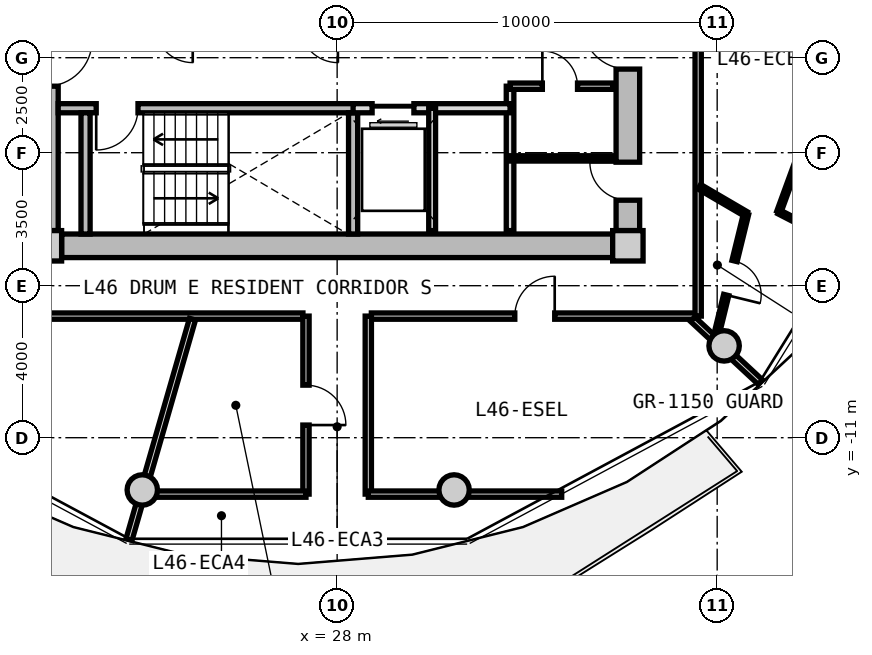
"""IFC4 building model, lengths in metres.
Left out: names, types, materials, properties, quantities, classifications, styles, units other than length and angle.
Written with IfcOpenShell. Run it as: python <this file> out.ifc"""

import sys

from ifc_helpers import new_model, si_unit, direction, frame, frame_2d, origin, origin_2d, place, context, subcontext, project, spatial, rectangle, circle, extrude, source, transform, mapped, element, fill, save


model = new_model("IFC4")
c1 = context("Model", 3, precision=1e-05, world=origin(), true_north=direction((0.0, 1.0)))
c2 = subcontext(c1, "Body", "Model", "MODEL_VIEW")
j1 = project(units=[si_unit("LENGTHUNIT", "METRE"), si_unit("PLANEANGLEUNIT", "RADIAN")], contexts=[c1])
p1 = place(None, origin())
s1 = spatial("IfcSite", under=j1, at=p1, CompositionType="ELEMENT")
p2 = place(p1, origin())
s2 = spatial("IfcBuilding", under=s1, at=p2, CompositionType="ELEMENT")
p3 = place(p2, frame((0.0, 0.0, 149.55)))
s3 = spatial("IfcBuildingStorey", under=s2, at=p3, CompositionType="ELEMENT", Elevation=149.55)
m1 = source(origin(), c2, "Body", "SweptSolid", [
    extrude(rectangle(XDim=0.8, YDim=0.8, at=origin_2d()), origin(), (0.0, 0.0, 1.0), 3.05),
])
for number, where, z_axis, x_axis in (
    (1, (20.35, -5.95, 0.0), (0.0, 0.0, 1.0), (1.0, 0.0, 0.0)),
    (2, (35.65, -5.95, 0.0), (0.0, 0.0, 1.0), (1.0, 0.0, 0.0)),
):
    element("IfcColumn", number, at=place(p3, frame(where, z_axis=z_axis, x_axis=x_axis)), inside=s3, PredefinedType="COLUMN", context=c2, shape_type="MappedRepresentation", body=[
        mapped(m1, transform((0.0, 0.0, 0.0), x_axis=(1.0, 0.0, 0.0), y_axis=(0.0, 1.0, 0.0), z_axis=(0.0, 0.0, 1.0), scale=1.0)),
    ])
m2 = source(origin(), c2, "Body", "SweptSolid", [
    extrude(rectangle(XDim=14.5, YDim=0.62, at=frame_2d((7.25, 0.0))), origin(), (0.0, 0.0, 1.0), 2.81),
])
p4 = place(p3, frame((35.25, -5.95, 0.0), z_axis=(0.0, 0.0, 1.0), x_axis=(-1.0, 0.0, 0.0)))
e3 = element("IfcWall", 3, at=p4, inside=s3, PredefinedType="SHEAR", context=c2, shape_type="MappedRepresentation", body=[
    mapped(m2, transform((0.0, 0.0, 0.0), x_axis=(1.0, 0.0, 0.0), y_axis=(0.0, 1.0, 0.0), z_axis=(0.0, 0.0, 1.0), scale=1.0)),
])
m3 = source(origin(), c2, "Body", "SweptSolid", [
    extrude(rectangle(XDim=11.1, YDim=0.62, at=frame_2d((5.55, 0.0))), origin(), (0.0, 0.0, 1.0), 2.81),
])
p5 = place(p3, frame((20.35, -5.55, 0.0), z_axis=(0.0, 0.0, 1.0), x_axis=(0.0, 1.0, 0.0)))
e4 = element("IfcWall", 4, at=p5, inside=s3, PredefinedType="SHEAR", context=c2, shape_type="MappedRepresentation", body=[
    mapped(m3, transform((0.0, 0.0, 0.0), x_axis=(1.0, 0.0, 0.0), y_axis=(0.0, 1.0, 0.0), z_axis=(0.0, 0.0, 1.0), scale=1.0)),
])
p6 = place(p5, frame((3.8, 0.0, 0.0)))
e5 = element("IfcOpeningElement", 5, at=p6, cuts=e4, PredefinedType="OPENING", context=c2, shape_type="SweptSolid", body=[
    extrude(rectangle(XDim=1.2, YDim=2.15, at=frame_2d((0.6, 1.075))), frame((0.0, 0.32, 0.0), z_axis=(0.0, -1.0, 0.0), x_axis=(1.0, 0.0, 0.0)), (0.0, 0.0, 1.0), 0.64),
])
p7 = place(p3, frame((35.65, 5.55, 0.0), z_axis=(0.0, 0.0, 1.0), x_axis=(0.0, -1.0, 0.0)))
e6 = element("IfcWall", 6, at=p7, inside=s3, PredefinedType="SHEAR", context=c2, shape_type="MappedRepresentation", body=[
    mapped(m3, transform((0.0, 0.0, 0.0), x_axis=(1.0, 0.0, 0.0), y_axis=(0.0, 1.0, 0.0), z_axis=(0.0, 0.0, 1.0), scale=1.0)),
])
p8 = place(p7, frame((5.65, 0.0, 0.0)))
e7 = element("IfcOpeningElement", 7, at=p8, cuts=e6, PredefinedType="OPENING", context=c2, shape_type="SweptSolid", body=[
    extrude(rectangle(XDim=1.2, YDim=2.15, at=frame_2d((0.6, 1.075))), frame((0.0, 0.32, 0.0), z_axis=(0.0, -1.0, 0.0), x_axis=(1.0, 0.0, 0.0)), (0.0, 0.0, 1.0), 0.64),
])
p9 = place(p7, frame((9.3, 0.0, 0.0)))
e8 = element("IfcOpeningElement", 8, at=p9, cuts=e6, PredefinedType="OPENING", context=c2, shape_type="SweptSolid", body=[
    extrude(rectangle(XDim=1.0, YDim=2.1, at=frame_2d((0.5, 1.05))), frame((0.0, 0.32, 0.0), z_axis=(0.0, -1.0, 0.0), x_axis=(1.0, 0.0, 0.0)), (0.0, 0.0, 1.0), 0.64),
])
m4 = source(origin(), c2, "Body", "SweptSolid", [
    extrude(circle(Radius=0.4, at=origin_2d()), origin(), (0.0, 0.0, 1.0), 3.05),
])
for number, where, z_axis, x_axis in (
    (9, (22.873, -12.375, 0.0), (0.0, 0.0, 1.0), (1.0, 0.0, 0.0)),
    (10, (31.077, -12.375, 0.0), (0.0, 0.0, 1.0), (1.0, 0.0, 0.0)),
    (11, (38.183, -8.584, 0.0), (0.0, 0.0, 1.0), (1.0, 0.0, 0.0)),
):
    element("IfcColumn", number, at=place(p3, frame(where, z_axis=z_axis, x_axis=x_axis)), inside=s3, PredefinedType="COLUMN", context=c2, shape_type="MappedRepresentation", body=[
        mapped(m4, transform((0.0, 0.0, 0.0), x_axis=(1.0, 0.0, 0.0), y_axis=(0.0, 1.0, 0.0), z_axis=(0.0, 0.0, 1.0), scale=1.0)),
    ])
m5 = source(origin(), c2, "Body", "SweptSolid", [
    extrude(rectangle(XDim=7.88, YDim=0.24, at=frame_2d((3.94, 0.0))), origin(), (0.0, 0.0, 1.0), 2.81),
])
p10 = place(p3, frame((20.66, -2.33, 0.0), z_axis=(0.0, 0.0, 1.0), x_axis=(1.0, 0.0, 0.0)))
e12 = element("IfcWall", 12, at=p10, inside=s3, PredefinedType="PARTITIONING", context=c2, shape_type="MappedRepresentation", body=[
    mapped(m5, transform((0.0, 0.0, 0.0), x_axis=(1.0, 0.0, 0.0), y_axis=(0.0, 1.0, 0.0), z_axis=(0.0, 0.0, 1.0), scale=1.0)),
])
p11 = place(p10, frame((1.0, 0.0, 0.0)))
e13 = element("IfcOpeningElement", 13, at=p11, cuts=e12, PredefinedType="OPENING", context=c2, shape_type="SweptSolid", body=[
    extrude(rectangle(XDim=1.1, YDim=2.15, at=frame_2d((0.55, 1.075))), frame((0.0, 0.13, 0.0), z_axis=(0.0, -1.0, 0.0), x_axis=(1.0, 0.0, 0.0)), (0.0, 0.0, 1.0), 0.26),
])
m6 = source(origin(), c2, "Body", "SweptSolid", [
    extrude(rectangle(XDim=3.19, YDim=0.24, at=frame_2d((1.595, 0.0))), origin(), (0.0, 0.0, 1.0), 2.81),
])
for number, where, z_axis, x_axis in (
    (14, (21.38, -5.64, 0.0), (0.0, 0.0, 1.0), (0.0, 1.0, 0.0)),
    (15, (28.42, -5.64, 0.0), (0.0, 0.0, 1.0), (0.0, 1.0, 0.0)),
):
    element("IfcWall", number, at=place(p3, frame(where, z_axis=z_axis, x_axis=x_axis)), inside=s3, PredefinedType="PARTITIONING", context=c2, shape_type="MappedRepresentation", body=[
        mapped(m6, transform((0.0, 0.0, 0.0), x_axis=(1.0, 0.0, 0.0), y_axis=(0.0, 1.0, 0.0), z_axis=(0.0, 0.0, 1.0), scale=1.0)),
    ])
m7 = source(origin(), c2, "Body", "SweptSolid", [
    extrude(rectangle(XDim=3.8, YDim=0.2, at=frame_2d((1.9, 0.0))), origin(), (0.0, 0.0, 1.0), 2.795),
])
p12 = place(p3, frame((32.55, -5.55, 0.0), z_axis=(0.0, 0.0, 1.0), x_axis=(0.0, 1.0, 0.0)))
e16 = element("IfcWall", 16, at=p12, inside=s3, PredefinedType="PARTITIONING", context=c2, shape_type="MappedRepresentation", body=[
    mapped(m7, transform((0.0, 0.0, 0.0), x_axis=(1.0, 0.0, 0.0), y_axis=(0.0, 1.0, 0.0), z_axis=(0.0, 0.0, 1.0), scale=1.0)),
])
m8 = source(origin(), c2, "Body", "SweptSolid", [
    extrude(rectangle(XDim=4.13, YDim=0.24, at=frame_2d((2.065, 0.0))), origin(), (0.0, 0.0, 1.0), 2.795),
])
p13 = place(p3, frame((28.42, -2.33, 0.0), z_axis=(0.0, 0.0, 1.0), x_axis=(1.0, 0.0, 0.0)))
e17 = element("IfcWall", 17, at=p13, inside=s3, PredefinedType="PARTITIONING", context=c2, shape_type="MappedRepresentation", body=[
    mapped(m8, transform((0.0, 0.0, 0.0), x_axis=(1.0, 0.0, 0.0), y_axis=(0.0, 1.0, 0.0), z_axis=(0.0, 0.0, 1.0), scale=1.0)),
])
p14 = place(p13, frame((0.5, 0.0, 0.0)))
e18 = element("IfcOpeningElement", 18, at=p14, cuts=e17, PredefinedType="OPENING", context=c2, shape_type="SweptSolid", body=[
    extrude(rectangle(XDim=1.1, YDim=2.2, at=frame_2d((0.55, 1.1))), frame((0.0, 0.13, 0.0), z_axis=(0.0, -1.0, 0.0), x_axis=(1.0, 0.0, 0.0)), (0.0, 0.0, 1.0), 0.26),
])
m9 = source(origin(), c2, "Body", "SweptSolid", [
    extrude(rectangle(XDim=3.22, YDim=0.18, at=frame_2d((1.61, 0.0))), origin(), (0.0, 0.0, 1.0), 2.795),
])
p15 = place(p3, frame((30.5, -5.55, 0.0), z_axis=(0.0, 0.0, 1.0), x_axis=(0.0, 1.0, 0.0)))
e19 = element("IfcWall", 19, at=p15, inside=s3, PredefinedType="PARTITIONING", context=c2, shape_type="MappedRepresentation", body=[
    mapped(m9, transform((0.0, 0.0, 0.0), x_axis=(1.0, 0.0, 0.0), y_axis=(0.0, 1.0, 0.0), z_axis=(0.0, 0.0, 1.0), scale=1.0)),
])
m10 = source(origin(), c2, "Body", "SweptSolid", [
    extrude(rectangle(XDim=2.7, YDim=0.165, at=frame_2d((1.35, 0.0))), origin(), (0.0, 0.0, 1.0), 2.795),
])
p16 = place(p3, frame((32.55, -1.75, 0.0), z_axis=(0.0, 0.0, 1.0), x_axis=(1.0, 0.0, 0.0)))
e20 = element("IfcWall", 20, at=p16, inside=s3, PredefinedType="PARTITIONING", context=c2, shape_type="MappedRepresentation", body=[
    mapped(m10, transform((0.0, 0.0, 0.0), x_axis=(1.0, 0.0, 0.0), y_axis=(0.0, 1.0, 0.0), z_axis=(0.0, 0.0, 1.0), scale=1.0)),
])
p17 = place(p16, frame((0.85, 0.0, 0.0)))
e21 = element("IfcOpeningElement", 21, at=p17, cuts=e20, PredefinedType="OPENING", context=c2, shape_type="SweptSolid", body=[
    extrude(rectangle(XDim=0.925, YDim=2.1, at=frame_2d((0.462, 1.05))), frame((0.0, 0.093, 0.0), z_axis=(0.0, -1.0, 0.0), x_axis=(1.0, 0.0, 0.0)), (0.0, 0.0, 1.0), 0.185),
])
m11 = source(origin(), c2, "Body", "SweptSolid", [
    extrude(rectangle(XDim=2.7, YDim=0.14, at=frame_2d((1.35, 0.0))), origin(), (0.0, 0.0, 1.0), 2.795),
])
p18 = place(p3, frame((32.55, -3.65, 0.0), z_axis=(0.0, 0.0, 1.0), x_axis=(1.0, 0.0, 0.0)))
e22 = element("IfcWall", 22, at=p18, inside=s3, PredefinedType="PARTITIONING", context=c2, shape_type="MappedRepresentation", body=[
    mapped(m11, transform((0.0, 0.0, 0.0), x_axis=(1.0, 0.0, 0.0), y_axis=(0.0, 1.0, 0.0), z_axis=(0.0, 0.0, 1.0), scale=1.0)),
])
m12 = source(origin(), c2, "Body", "SweptSolid", [
    extrude(rectangle(XDim=8.6, YDim=0.165, at=frame_2d((4.3, 0.0))), origin(), (0.0, 0.0, 1.0), 2.795),
])
p19 = place(p3, frame((37.5, -7.8, 0.0), z_axis=(0.0, 0.0, 1.0), x_axis=(-1.0, 0.0, 0.0)))
e23 = element("IfcWall", 23, at=p19, inside=s3, PredefinedType="PARTITIONING", context=c2, shape_type="MappedRepresentation", body=[
    mapped(m12, transform((0.0, 0.0, 0.0), x_axis=(1.0, 0.0, 0.0), y_axis=(0.0, 1.0, 0.0), z_axis=(0.0, 0.0, 1.0), scale=1.0)),
])
p20 = place(p19, frame((3.775, 0.0, 0.0)))
e24 = element("IfcOpeningElement", 24, at=p20, cuts=e23, PredefinedType="OPENING", context=c2, shape_type="SweptSolid", body=[
    extrude(rectangle(XDim=1.05, YDim=2.15, at=frame_2d((0.525, 1.075))), frame((0.0, 0.093, 0.0), z_axis=(0.0, -1.0, 0.0), x_axis=(1.0, 0.0, 0.0)), (0.0, 0.0, 1.0), 0.185),
])
p21 = place(p3, frame((27.1, -7.8, 0.0), z_axis=(0.0, 0.0, 1.0), x_axis=(-1.0, 0.0, 0.0)))
e25 = element("IfcWall", 25, at=p21, inside=s3, PredefinedType="PARTITIONING", context=c2, shape_type="MappedRepresentation", body=[
    mapped(m12, transform((0.0, 0.0, 0.0), x_axis=(1.0, 0.0, 0.0), y_axis=(0.0, 1.0, 0.0), z_axis=(0.0, 0.0, 1.0), scale=1.0)),
])
m13 = source(origin(), c2, "Body", "SweptSolid", [
    extrude(rectangle(XDim=15.6, YDim=0.165, at=frame_2d((7.8, 0.0))), origin(), (0.0, 0.0, 1.0), 2.795),
])
p22 = place(p3, frame((37.5, 7.8, 0.0), z_axis=(0.0, 0.0, 1.0), x_axis=(0.0, -1.0, 0.0)))
e26 = element("IfcWall", 26, at=p22, inside=s3, PredefinedType="PARTITIONING", context=c2, shape_type="MappedRepresentation", body=[
    mapped(m13, transform((0.0, 0.0, 0.0), x_axis=(1.0, 0.0, 0.0), y_axis=(0.0, 1.0, 0.0), z_axis=(0.0, 0.0, 1.0), scale=1.0)),
])
p23 = place(p22, frame((5.687, 0.0, 0.0)))
e27 = element("IfcOpeningElement", 27, at=p23, cuts=e26, PredefinedType="OPENING", context=c2, shape_type="SweptSolid", body=[
    extrude(rectangle(XDim=1.05, YDim=2.15, at=frame_2d((0.525, 1.075))), frame((0.0, 0.093, 0.0), z_axis=(0.0, -1.0, 0.0), x_axis=(1.0, 0.0, 0.0)), (0.0, 0.0, 1.0), 0.185),
])
m14 = source(origin(), c2, "Body", "SweptSolid", [
    extrude(rectangle(XDim=6.035, YDim=0.165, at=frame_2d((3.018, 0.0))), origin(), (0.0, 0.0, 1.0), 2.345),
])
p24 = place(p3, frame((24.194, -7.88, 0.0), z_axis=(0.0, 0.0, 1.0), x_axis=(-0.276809454862, -0.960924828329, 0.0)))
e28 = element("IfcWall", 28, at=p24, inside=s3, PredefinedType="PARTITIONING", context=c2, shape_type="MappedRepresentation", body=[
    mapped(m14, transform((0.0, 0.0, 0.0), x_axis=(1.0, 0.0, 0.0), y_axis=(0.0, 1.0, 0.0), z_axis=(0.0, 0.0, 1.0), scale=1.0)),
])
m15 = source(origin(), c2, "Body", "SweptSolid", [
    extrude(rectangle(XDim=2.435, YDim=0.165, at=frame_2d((1.217, 0.0))), origin(), (0.0, 0.0, 1.0), 2.345),
])
p25 = place(p3, frame((37.354, -7.88, 0.0), z_axis=(0.0, 0.0, 1.0), x_axis=(0.732164643118, -0.681127693878, 0.0)))
e29 = element("IfcWall", 29, at=p25, inside=s3, PredefinedType="PARTITIONING", context=c2, shape_type="MappedRepresentation", body=[
    mapped(m15, transform((0.0, 0.0, 0.0), x_axis=(1.0, 0.0, 0.0), y_axis=(0.0, 1.0, 0.0), z_axis=(0.0, 0.0, 1.0), scale=1.0)),
])
m16 = source(origin(), c2, "Body", "SweptSolid", [
    extrude(rectangle(XDim=4.685, YDim=0.165, at=frame_2d((2.342, 0.0))), origin(), (0.0, 0.0, 1.0), 2.795),
])
p26 = place(p3, frame((27.18, -12.485, 0.0), z_axis=(0.0, 0.0, 1.0), x_axis=(0.0, 1.0, 0.0)))
e30 = element("IfcWall", 30, at=p26, inside=s3, PredefinedType="PARTITIONING", context=c2, shape_type="MappedRepresentation", body=[
    mapped(m16, transform((0.0, 0.0, 0.0), x_axis=(1.0, 0.0, 0.0), y_axis=(0.0, 1.0, 0.0), z_axis=(0.0, 0.0, 1.0), scale=1.0)),
])
p27 = place(p26, frame((1.817, 0.0, 0.0)))
e31 = element("IfcOpeningElement", 31, at=p27, cuts=e30, PredefinedType="OPENING", context=c2, shape_type="SweptSolid", body=[
    extrude(rectangle(XDim=1.05, YDim=2.15, at=frame_2d((0.525, 1.075))), frame((0.0, 0.093, 0.0), z_axis=(0.0, -1.0, 0.0), x_axis=(1.0, 0.0, 0.0)), (0.0, 0.0, 1.0), 0.185),
])
m17 = source(origin(), c2, "Body", "SweptSolid", [
    extrude(rectangle(XDim=4.469, YDim=0.165, at=frame_2d((2.234, 0.0))), origin(), (0.0, 0.0, 1.0), 2.345),
])
p28 = place(p3, frame((22.711, -12.485, 0.0), z_axis=(0.0, 0.0, 1.0), x_axis=(1.0, 0.0, 0.0)))
e32 = element("IfcWall", 32, at=p28, inside=s3, PredefinedType="PARTITIONING", context=c2, shape_type="MappedRepresentation", body=[
    mapped(m17, transform((0.0, 0.0, 0.0), x_axis=(1.0, 0.0, 0.0), y_axis=(0.0, 1.0, 0.0), z_axis=(0.0, 0.0, 1.0), scale=1.0)),
])
p29 = place(p3, frame((28.82, -12.485, 0.0), z_axis=(0.0, 0.0, 1.0), x_axis=(0.0, 1.0, 0.0)))
e33 = element("IfcWall", 33, at=p29, inside=s3, PredefinedType="PARTITIONING", context=c2, shape_type="MappedRepresentation", body=[
    mapped(m16, transform((0.0, 0.0, 0.0), x_axis=(1.0, 0.0, 0.0), y_axis=(0.0, 1.0, 0.0), z_axis=(0.0, 0.0, 1.0), scale=1.0)),
])
m18 = source(origin(), c2, "Body", "SweptSolid", [
    extrude(rectangle(XDim=5.089, YDim=0.165, at=frame_2d((2.544, 0.0))), origin(), (0.0, 0.0, 1.0), 2.345),
])
p30 = place(p3, frame((28.82, -12.485, 0.0), z_axis=(0.0, 0.0, 1.0), x_axis=(1.0, 0.0, 0.0)))
e34 = element("IfcWall", 34, at=p30, inside=s3, PredefinedType="PARTITIONING", context=c2, shape_type="MappedRepresentation", body=[
    mapped(m18, transform((0.0, 0.0, 0.0), x_axis=(1.0, 0.0, 0.0), y_axis=(0.0, 1.0, 0.0), z_axis=(0.0, 0.0, 1.0), scale=1.0)),
])
m19 = source(origin(), c2, "Body", "SweptSolid", [
    extrude(rectangle(XDim=1.425, YDim=0.14, at=frame_2d((0.712, 0.0))), origin(), (0.0, 0.0, 1.0), 2.795),
])
p31 = place(p3, frame((37.53, -4.396, 0.0), z_axis=(0.0, 0.0, 1.0), x_axis=(0.86324395577, -0.50478695786, 0.0)))
e35 = element("IfcWall", 35, at=p31, inside=s3, PredefinedType="PARTITIONING", context=c2, shape_type="MappedRepresentation", body=[
    mapped(m19, transform((0.0, 0.0, 0.0), x_axis=(1.0, 0.0, 0.0), y_axis=(0.0, 1.0, 0.0), z_axis=(0.0, 0.0, 1.0), scale=1.0)),
])
m20 = source(origin(), c2, "Body", "SweptSolid", [
    extrude(rectangle(XDim=3.464, YDim=0.14, at=frame_2d((1.732, 0.0))), origin(), (0.0, 0.0, 1.0), 2.795),
])
p32 = place(p3, frame((38.76, -5.115, 0.0), z_axis=(0.0, 0.0, 1.0), x_axis=(-0.238055968485, -0.971251438027, 0.0)))
e36 = element("IfcWall", 36, at=p32, inside=s3, PredefinedType="PARTITIONING", context=c2, shape_type="MappedRepresentation", body=[
    mapped(m20, transform((0.0, 0.0, 0.0), x_axis=(1.0, 0.0, 0.0), y_axis=(0.0, 1.0, 0.0), z_axis=(0.0, 0.0, 1.0), scale=1.0)),
])
p33 = place(p32, frame((1.272, 0.0, 0.0)))
e37 = element("IfcOpeningElement", 37, at=p33, cuts=e36, PredefinedType="OPENING", context=c2, shape_type="SweptSolid", body=[
    extrude(rectangle(XDim=0.92, YDim=2.1, at=frame_2d((0.46, 1.05))), frame((0.0, 0.08, 0.0), z_axis=(0.0, -1.0, 0.0), x_axis=(1.0, 0.0, 0.0)), (0.0, 0.0, 1.0), 0.16),
])
m21 = source(origin(), c2, "Body", "SweptSolid", [
    extrude(rectangle(XDim=1.957, YDim=0.115, at=frame_2d((0.979, 0.0))), origin(), (0.0, 0.0, 1.0), 2.795),
])
p34 = place(p3, frame((39.623, -5.057, 0.0), z_axis=(0.0, 0.0, 1.0), x_axis=(0.889228358674, -0.45746357902, 0.0)))
e38 = element("IfcWall", 38, at=p34, inside=s3, PredefinedType="PARTITIONING", context=c2, shape_type="MappedRepresentation", body=[
    mapped(m21, transform((0.0, 0.0, 0.0), x_axis=(1.0, 0.0, 0.0), y_axis=(0.0, 1.0, 0.0), z_axis=(0.0, 0.0, 1.0), scale=1.0)),
])
m22 = source(origin(), c2, "Body", "SweptSolid", [
    extrude(rectangle(XDim=3.571, YDim=0.115, at=frame_2d((1.786, 0.0))), origin(), (0.0, 0.0, 1.0), 2.795),
])
p35 = place(p3, frame((39.623, -5.057, 0.0), z_axis=(0.0, 0.0, 1.0), x_axis=(0.343515356993, 0.939147059576, 0.0)))
e39 = element("IfcWall", 39, at=p35, inside=s3, PredefinedType="PARTITIONING", context=c2, shape_type="MappedRepresentation", body=[
    mapped(m22, transform((0.0, 0.0, 0.0), x_axis=(1.0, 0.0, 0.0), y_axis=(0.0, 1.0, 0.0), z_axis=(0.0, 0.0, 1.0), scale=1.0)),
])
p36 = place(p35, frame((1.311, 0.0, 0.0)))
e40 = element("IfcOpeningElement", 40, at=p36, cuts=e39, PredefinedType="OPENING", context=c2, shape_type="SweptSolid", body=[
    extrude(rectangle(XDim=0.95, YDim=2.1, at=frame_2d((0.475, 1.05))), frame((0.0, 0.067, 0.0), z_axis=(0.0, -1.0, 0.0), x_axis=(1.0, 0.0, 0.0)), (0.0, 0.0, 1.0), 0.135),
])
m23 = source(origin(), c2, "Body", "SweptSolid", [
    extrude(rectangle(XDim=1.1, YDim=2.15, at=frame_2d((0.55, 1.075))), frame((0.0, 0.025, 0.0), z_axis=(0.0, -1.0, 0.0), x_axis=(1.0, 0.0, 0.0)), (0.0, 0.0, 1.0), 0.05),
])
p37 = place(p11, frame((1.1, 0.0, 0.0), z_axis=(0.0, 0.0, 1.0), x_axis=(-1.0, 0.0, 0.0)))
e41 = element("IfcDoor", 41, at=p37, inside=s3, OperationType="SINGLE_SWING_RIGHT", PredefinedType="DOOR", context=c2, shape_type="MappedRepresentation", body=[
    mapped(m23, transform((0.0, 0.0, 0.0), x_axis=(1.0, 0.0, 0.0), y_axis=(0.0, 1.0, 0.0), z_axis=(0.0, 0.0, 1.0), scale=1.0)),
])
fill(e13, e41)
m24 = source(origin(), c2, "Body", "SweptSolid", [
    extrude(rectangle(XDim=1.2, YDim=2.15, at=frame_2d((0.6, 1.075))), frame((0.0, 0.025, 0.0), z_axis=(0.0, -1.0, 0.0), x_axis=(1.0, 0.0, 0.0)), (0.0, 0.0, 1.0), 0.05),
])
p38 = place(p8, frame((1.2, 0.0, 0.0), z_axis=(0.0, 0.0, 1.0), x_axis=(-1.0, 0.0, 0.0)))
e42 = element("IfcDoor", 42, at=p38, inside=s3, OperationType="SINGLE_SWING_RIGHT", PredefinedType="DOOR", context=c2, shape_type="MappedRepresentation", body=[
    mapped(m24, transform((0.0, 0.0, 0.0), x_axis=(1.0, 0.0, 0.0), y_axis=(0.0, 1.0, 0.0), z_axis=(0.0, 0.0, 1.0), scale=1.0)),
])
fill(e7, e42)
m25 = source(origin(), c2, "Body", "SweptSolid", [
    extrude(rectangle(XDim=1.1, YDim=2.2, at=frame_2d((0.55, 1.1))), frame((0.0, 0.025, 0.0), z_axis=(0.0, -1.0, 0.0), x_axis=(1.0, 0.0, 0.0)), (0.0, 0.0, 1.0), 0.05),
])
p39 = place(p14, frame((1.1, 0.0, 0.0), z_axis=(0.0, 0.0, 1.0), x_axis=(-1.0, 0.0, 0.0)))
e43 = element("IfcDoor", 43, at=p39, inside=s3, OperationType="SLIDING_TO_LEFT", PredefinedType="DOOR", context=c2, shape_type="MappedRepresentation", body=[
    mapped(m25, transform((0.0, 0.0, 0.0), x_axis=(1.0, 0.0, 0.0), y_axis=(0.0, 1.0, 0.0), z_axis=(0.0, 0.0, 1.0), scale=1.0)),
])
fill(e18, e43)
m26 = source(origin(), c2, "Body", "SweptSolid", [
    extrude(rectangle(XDim=0.925, YDim=2.1, at=frame_2d((0.462, 1.05))), frame((0.0, 0.025, 0.0), z_axis=(0.0, -1.0, 0.0), x_axis=(1.0, 0.0, 0.0)), (0.0, 0.0, 1.0), 0.05),
])
p40 = place(p17, origin())
e44 = element("IfcDoor", 44, at=p40, inside=s3, OperationType="SINGLE_SWING_LEFT", PredefinedType="DOOR", context=c2, shape_type="MappedRepresentation", body=[
    mapped(m26, transform((0.0, 0.0, 0.0), x_axis=(1.0, 0.0, 0.0), y_axis=(0.0, 1.0, 0.0), z_axis=(0.0, 0.0, 1.0), scale=1.0)),
])
fill(e21, e44)
m27 = source(origin(), c2, "Body", "SweptSolid", [
    extrude(rectangle(XDim=1.0, YDim=2.1, at=frame_2d((0.5, 1.05))), frame((0.0, 0.025, 0.0), z_axis=(0.0, -1.0, 0.0), x_axis=(1.0, 0.0, 0.0)), (0.0, 0.0, 1.0), 0.05),
])
p41 = place(p9, frame((1.0, 0.0, 0.0), z_axis=(0.0, 0.0, 1.0), x_axis=(-1.0, 0.0, 0.0)))
e45 = element("IfcDoor", 45, at=p41, inside=s3, OperationType="SINGLE_SWING_RIGHT", PredefinedType="DOOR", context=c2, shape_type="MappedRepresentation", body=[
    mapped(m27, transform((0.0, 0.0, 0.0), x_axis=(1.0, 0.0, 0.0), y_axis=(0.0, 1.0, 0.0), z_axis=(0.0, 0.0, 1.0), scale=1.0)),
])
fill(e8, e45)
m28 = source(origin(), c2, "Body", "SweptSolid", [
    extrude(rectangle(XDim=1.05, YDim=2.15, at=frame_2d((0.525, 1.075))), frame((0.0, 0.025, 0.0), z_axis=(0.0, -1.0, 0.0), x_axis=(1.0, 0.0, 0.0)), (0.0, 0.0, 1.0), 0.05),
])
p42 = place(p27, frame((1.05, 0.0, 0.0), z_axis=(0.0, 0.0, 1.0), x_axis=(-1.0, 0.0, 0.0)))
e46 = element("IfcDoor", 46, at=p42, inside=s3, OperationType="SINGLE_SWING_RIGHT", PredefinedType="DOOR", context=c2, shape_type="MappedRepresentation", body=[
    mapped(m28, transform((0.0, 0.0, 0.0), x_axis=(1.0, 0.0, 0.0), y_axis=(0.0, 1.0, 0.0), z_axis=(0.0, 0.0, 1.0), scale=1.0)),
])
fill(e31, e46)
p43 = place(p20, frame((1.05, 0.0, 0.0), z_axis=(0.0, 0.0, 1.0), x_axis=(-1.0, 0.0, 0.0)))
e47 = element("IfcDoor", 47, at=p43, inside=s3, OperationType="SINGLE_SWING_RIGHT", PredefinedType="DOOR", context=c2, shape_type="MappedRepresentation", body=[
    mapped(m28, transform((0.0, 0.0, 0.0), x_axis=(1.0, 0.0, 0.0), y_axis=(0.0, 1.0, 0.0), z_axis=(0.0, 0.0, 1.0), scale=1.0)),
])
fill(e24, e47)
m29 = source(origin(), c2, "Body", "SweptSolid", [
    extrude(rectangle(XDim=0.92, YDim=2.1, at=frame_2d((0.46, 1.05))), frame((0.0, 0.025, 0.0), z_axis=(0.0, -1.0, 0.0), x_axis=(1.0, 0.0, 0.0)), (0.0, 0.0, 1.0), 0.05),
])
p44 = place(p33, origin())
e48 = element("IfcDoor", 48, at=p44, inside=s3, OperationType="SINGLE_SWING_RIGHT", PredefinedType="DOOR", context=c2, shape_type="MappedRepresentation", body=[
    mapped(m29, transform((0.0, 0.0, 0.0), x_axis=(1.0, 0.0, 0.0), y_axis=(0.0, 1.0, 0.0), z_axis=(0.0, 0.0, 1.0), scale=1.0)),
])
fill(e37, e48)
save(model, sys.argv[1])
